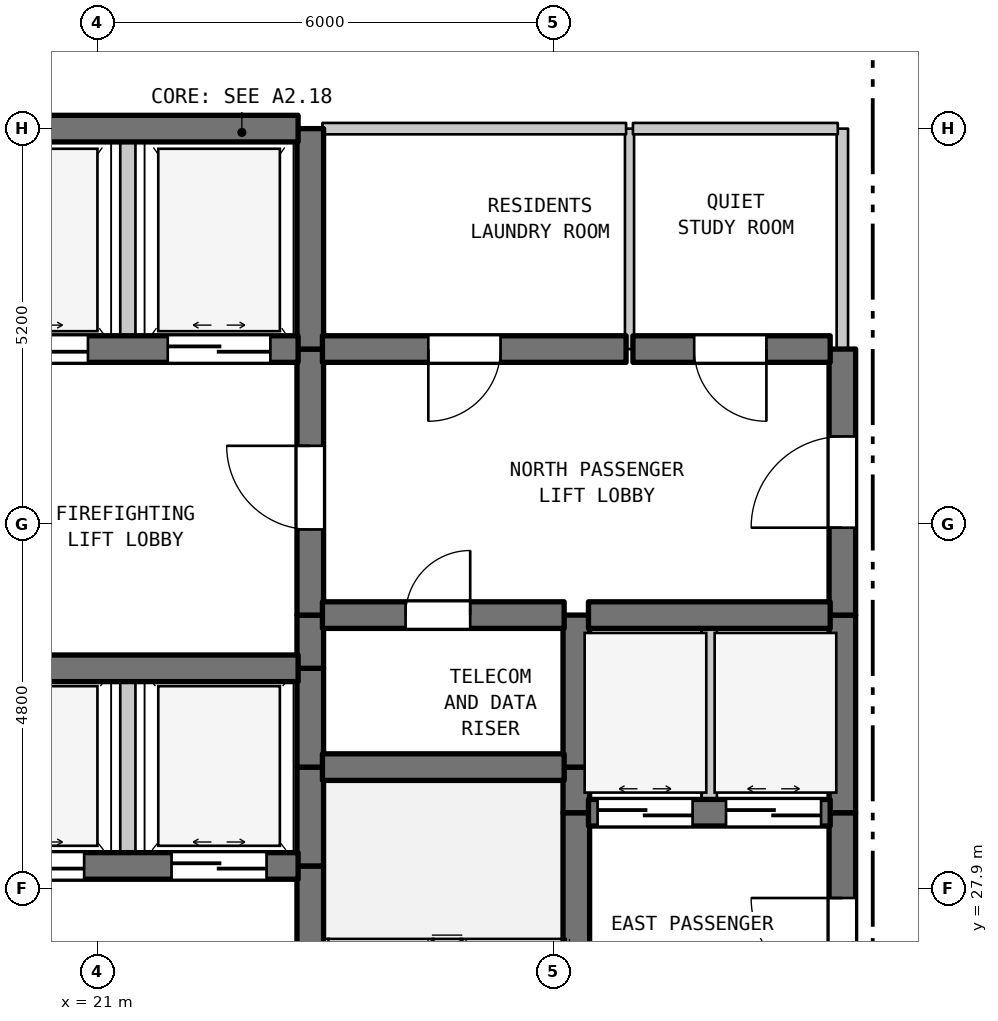
"""IFC4 building model, lengths in metres.
Left out: names, types, materials, properties, quantities, classifications, styles, units other than length and angle.
Written with IfcOpenShell. Run it as: python <this file> out.ifc"""

import sys

from ifc_helpers import new_model, si_unit, direction, frame, frame_2d, origin, place, context, subcontext, project, spatial, rectangle, extrude, element, fill, save


model = new_model("IFC4")
c1 = context("Model", 3, precision=1e-05, world=origin(), true_north=direction((0.0, 1.0)))
c2 = subcontext(c1, "Body", "Model", "MODEL_VIEW")
j1 = project(units=[si_unit("LENGTHUNIT", "METRE"), si_unit("PLANEANGLEUNIT", "RADIAN")], contexts=[c1])
p1 = place(None, origin())
s1 = spatial("IfcSite", under=j1, at=p1, CompositionType="ELEMENT")
p2 = place(p1, origin())
s2 = spatial("IfcBuilding", under=s1, at=p2, CompositionType="ELEMENT")
p3 = place(p2, frame((0.0, 0.0, 148.3)))
s3 = spatial("IfcBuildingStorey", under=s2, at=p3, CompositionType="ELEMENT", Elevation=148.3)
p4 = place(p3, frame((21.4, 28.2, 0.0), z_axis=(0.0, 0.0, 1.0), x_axis=(0.0, 1.0, 0.0)))
e1 = element("IfcWall", 1, at=p4, inside=s3, PredefinedType="STANDARD", context=c2, shape_type="SweptSolid", body=[
    extrude(rectangle(XDim=2.6, YDim=0.2, at=frame_2d((1.3, 0.0))), origin(), (0.0, 0.0, 1.0), 3.385),
])
p5 = place(p3, frame((21.4, 35.0, 0.0), z_axis=(0.0, 0.0, 1.0), x_axis=(0.0, 1.0, 0.0)))
e2 = element("IfcWall", 2, at=p5, inside=s3, PredefinedType="STANDARD", context=c2, shape_type="SweptSolid", body=[
    extrude(rectangle(XDim=2.9, YDim=0.2, at=frame_2d((1.45, 0.0))), origin(), (0.0, 0.0, 1.0), 3.385),
])
p6 = place(p3, frame((23.8, 22.7, 0.0), z_axis=(0.0, 0.0, 1.0), x_axis=(0.0, 1.0, 0.0)))
e3 = element("IfcWall", 3, at=p6, inside=s3, PredefinedType="SHEAR", context=c2, shape_type="SweptSolid", body=[
    extrude(rectangle(XDim=5.5, YDim=0.35, at=frame_2d((2.75, 0.0))), origin(), (0.0, 0.0, 1.0), 3.385),
])
p7 = place(p6, frame((0.235, 0.0, 0.0)))
e4 = element("IfcOpeningElement", 4, at=p7, cuts=e3, PredefinedType="OPENING", context=c2, shape_type="SweptSolid", body=[
    extrude(rectangle(XDim=1.1, YDim=2.15, at=frame_2d((0.55, 1.075))), frame((0.0, 0.185, 0.0), z_axis=(0.0, -1.0, 0.0), x_axis=(1.0, 0.0, 0.0)), (0.0, 0.0, 1.0), 0.37),
])
for number, where, z_axis, x_axis in (
    (5, (23.8, 28.2, 0.0), (0.0, 0.0, 1.0), (0.0, 1.0, 0.0)),
    (6, (23.8, 29.5, 0.0), (0.0, 0.0, 1.0), (0.0, 1.0, 0.0)),
):
    element("IfcWall", number, at=place(p3, frame(where, z_axis=z_axis, x_axis=x_axis)), inside=s3, PredefinedType="SHEAR", context=c2, shape_type="SweptSolid", body=[
        extrude(rectangle(XDim=1.3, YDim=0.35, at=frame_2d((0.65, 0.0))), origin(), (0.0, 0.0, 1.0), 3.385),
    ])
p8 = place(p3, frame((23.8, 30.8, 0.0), z_axis=(0.0, 0.0, 1.0), x_axis=(0.0, 1.0, 0.0)))
e7 = element("IfcWall", 7, at=p8, inside=s3, PredefinedType="SHEAR", context=c2, shape_type="SweptSolid", body=[
    extrude(rectangle(XDim=0.7, YDim=0.35, at=frame_2d((0.35, 0.0))), origin(), (0.0, 0.0, 1.0), 3.385),
])
p9 = place(p3, frame((23.8, 31.5, 0.0), z_axis=(0.0, 0.0, 1.0), x_axis=(0.0, 1.0, 0.0)))
e8 = element("IfcWall", 8, at=p9, inside=s3, PredefinedType="SHEAR", context=c2, shape_type="SweptSolid", body=[
    extrude(rectangle(XDim=3.5, YDim=0.35, at=frame_2d((1.75, 0.0))), origin(), (0.0, 0.0, 1.0), 3.385),
])
p10 = place(p9, frame((1.127, 0.0, 0.0)))
e9 = element("IfcOpeningElement", 9, at=p10, cuts=e8, PredefinedType="OPENING", context=c2, shape_type="SweptSolid", body=[
    extrude(rectangle(XDim=1.1, YDim=2.15, at=frame_2d((0.55, 1.075))), frame((0.0, 0.185, 0.0), z_axis=(0.0, -1.0, 0.0), x_axis=(1.0, 0.0, 0.0)), (0.0, 0.0, 1.0), 0.37),
])
p11 = place(p3, frame((23.8, 35.0, 0.0), z_axis=(0.0, 0.0, 1.0), x_axis=(0.0, 1.0, 0.0)))
e10 = element("IfcWall", 10, at=p11, inside=s3, PredefinedType="SHEAR", context=c2, shape_type="SweptSolid", body=[
    extrude(rectangle(XDim=2.9, YDim=0.35, at=frame_2d((1.45, 0.0))), origin(), (0.0, 0.0, 1.0), 3.385),
])
p12 = place(p3, frame((27.3, 25.6, 0.0), z_axis=(0.0, 0.0, 1.0), x_axis=(0.0, 1.0, 0.0)))
e11 = element("IfcWall", 11, at=p12, inside=s3, PredefinedType="SHEAR", context=c2, shape_type="SweptSolid", body=[
    extrude(rectangle(XDim=3.3, YDim=0.35, at=frame_2d((1.65, 0.0))), origin(), (0.0, 0.0, 1.0), 3.385),
])
p13 = place(p3, frame((27.3, 28.9, 0.0), z_axis=(0.0, 0.0, 1.0), x_axis=(0.0, 1.0, 0.0)))
e12 = element("IfcWall", 12, at=p13, inside=s3, PredefinedType="SHEAR", context=c2, shape_type="SweptSolid", body=[
    extrude(rectangle(XDim=0.6, YDim=0.35, at=frame_2d((0.3, 0.0))), origin(), (0.0, 0.0, 1.0), 3.385),
])
p14 = place(p3, frame((27.3, 29.5, 0.0), z_axis=(0.0, 0.0, 1.0), x_axis=(0.0, 1.0, 0.0)))
e13 = element("IfcWall", 13, at=p14, inside=s3, PredefinedType="SHEAR", context=c2, shape_type="SweptSolid", body=[
    extrude(rectangle(XDim=2.0, YDim=0.35, at=frame_2d((1.0, 0.0))), origin(), (0.0, 0.0, 1.0), 3.385),
])
p15 = place(p3, frame((28.0, 35.0, 0.0), z_axis=(0.0, 0.0, 1.0), x_axis=(0.0, 1.0, 0.0)))
e14 = element("IfcWall", 14, at=p15, inside=s3, PredefinedType="PARTITIONING", context=c2, shape_type="SweptSolid", body=[
    extrude(rectangle(XDim=2.9, YDim=0.12, at=frame_2d((1.45, 0.0))), origin(), (0.0, 0.0, 1.0), 3.385),
])
p16 = place(p3, frame((29.05, 28.9, 0.0), z_axis=(0.0, 0.0, 1.0), x_axis=(0.0, 1.0, 0.0)))
e15 = element("IfcWall", 15, at=p16, inside=s3, PredefinedType="STANDARD", context=c2, shape_type="SweptSolid", body=[
    extrude(rectangle(XDim=2.6, YDim=0.2, at=frame_2d((1.3, 0.0))), origin(), (0.0, 0.0, 1.0), 3.385),
])
p17 = place(p3, frame((30.8, 25.6, 0.0), z_axis=(0.0, 0.0, 1.0), x_axis=(0.0, 1.0, 0.0)))
e16 = element("IfcWall", 16, at=p17, inside=s3, PredefinedType="SHEAR", context=c2, shape_type="SweptSolid", body=[
    extrude(rectangle(XDim=3.3, YDim=0.35, at=frame_2d((1.65, 0.0))), origin(), (0.0, 0.0, 1.0), 3.385),
])
p18 = place(p17, frame((0.978, 0.0, 0.0)))
e17 = element("IfcOpeningElement", 17, at=p18, cuts=e16, PredefinedType="OPENING", context=c2, shape_type="SweptSolid", body=[
    extrude(rectangle(XDim=1.2, YDim=2.2, at=frame_2d((0.6, 1.1))), frame((0.0, 0.185, 0.0), z_axis=(0.0, -1.0, 0.0), x_axis=(1.0, 0.0, 0.0)), (0.0, 0.0, 1.0), 0.37),
])
p19 = place(p3, frame((30.8, 28.9, 0.0), z_axis=(0.0, 0.0, 1.0), x_axis=(0.0, 1.0, 0.0)))
e18 = element("IfcWall", 18, at=p19, inside=s3, PredefinedType="SHEAR", context=c2, shape_type="SweptSolid", body=[
    extrude(rectangle(XDim=2.6, YDim=0.35, at=frame_2d((1.3, 0.0))), origin(), (0.0, 0.0, 1.0), 3.385),
])
p20 = place(p3, frame((30.8, 31.5, 0.0), z_axis=(0.0, 0.0, 1.0), x_axis=(0.0, 1.0, 0.0)))
e19 = element("IfcWall", 19, at=p20, inside=s3, PredefinedType="SHEAR", context=c2, shape_type="SweptSolid", body=[
    extrude(rectangle(XDim=3.5, YDim=0.35, at=frame_2d((1.75, 0.0))), origin(), (0.0, 0.0, 1.0), 3.385),
])
p21 = place(p20, frame((1.15, 0.0, 0.0)))
e20 = element("IfcOpeningElement", 20, at=p21, cuts=e19, PredefinedType="OPENING", context=c2, shape_type="SweptSolid", body=[
    extrude(rectangle(XDim=1.2, YDim=2.2, at=frame_2d((0.6, 1.1))), frame((0.0, 0.185, 0.0), z_axis=(0.0, -1.0, 0.0), x_axis=(1.0, 0.0, 0.0)), (0.0, 0.0, 1.0), 0.37),
])
p22 = place(p3, frame((30.8, 35.0, 0.0), z_axis=(0.0, 0.0, 1.0), x_axis=(0.0, 1.0, 0.0)))
e21 = element("IfcWall", 21, at=p22, inside=s3, PredefinedType="STANDARD", context=c2, shape_type="SweptSolid", body=[
    extrude(rectangle(XDim=2.9, YDim=0.15, at=frame_2d((1.45, 0.0))), origin(), (0.0, 0.0, 1.0), 3.385),
])
p23 = place(p3, frame((19.16, 28.2, 0.0), z_axis=(0.0, 0.0, 1.0), x_axis=(1.0, 0.0, 0.0)))
e22 = element("IfcWall", 22, at=p23, inside=s3, PredefinedType="SHEAR", context=c2, shape_type="SweptSolid", body=[
    extrude(rectangle(XDim=4.48, YDim=0.35, at=frame_2d((2.24, 0.0))), origin(), (0.0, 0.0, 1.0), 3.385),
])
p24 = place(p23, frame((0.415, 0.0, 0.0)))
e23 = element("IfcOpeningElement", 23, at=p24, cuts=e22, PredefinedType="OPENING", context=c2, shape_type="SweptSolid", body=[
    extrude(rectangle(XDim=1.25, YDim=2.2, at=frame_2d((0.625, 1.1))), frame((0.0, 0.185, 0.0), z_axis=(0.0, -1.0, 0.0), x_axis=(1.0, 0.0, 0.0)), (0.0, 0.0, 1.0), 0.37),
])
p25 = place(p23, frame((2.815, 0.0, 0.0)))
e24 = element("IfcOpeningElement", 24, at=p25, cuts=e22, PredefinedType="OPENING", context=c2, shape_type="SweptSolid", body=[
    extrude(rectangle(XDim=1.25, YDim=2.2, at=frame_2d((0.625, 1.1))), frame((0.0, 0.185, 0.0), z_axis=(0.0, -1.0, 0.0), x_axis=(1.0, 0.0, 0.0)), (0.0, 0.0, 1.0), 0.37),
])
p26 = place(p3, frame((27.46, 28.9, 0.0), z_axis=(0.0, 0.0, 1.0), x_axis=(1.0, 0.0, 0.0)))
e25 = element("IfcWall", 25, at=p26, inside=s3, PredefinedType="SHEAR", context=c2, shape_type="SweptSolid", body=[
    extrude(rectangle(XDim=3.18, YDim=0.35, at=frame_2d((1.59, 0.0))), origin(), (0.0, 0.0, 1.0), 3.385),
])
p27 = place(p26, frame((0.12, 0.0, 0.0)))
e26 = element("IfcOpeningElement", 26, at=p27, cuts=e25, PredefinedType="OPENING", context=c2, shape_type="SweptSolid", body=[
    extrude(rectangle(XDim=1.25, YDim=2.2, at=frame_2d((0.625, 1.1))), frame((0.0, 0.185, 0.0), z_axis=(0.0, -1.0, 0.0), x_axis=(1.0, 0.0, 0.0)), (0.0, 0.0, 1.0), 0.37),
])
p28 = place(p26, frame((1.81, 0.0, 0.0)))
e27 = element("IfcOpeningElement", 27, at=p28, cuts=e25, PredefinedType="OPENING", context=c2, shape_type="SweptSolid", body=[
    extrude(rectangle(XDim=1.25, YDim=2.2, at=frame_2d((0.625, 1.1))), frame((0.0, 0.185, 0.0), z_axis=(0.0, -1.0, 0.0), x_axis=(1.0, 0.0, 0.0)), (0.0, 0.0, 1.0), 0.37),
])
p29 = place(p3, frame((23.96, 29.5, 0.0), z_axis=(0.0, 0.0, 1.0), x_axis=(1.0, 0.0, 0.0)))
e28 = element("IfcWall", 28, at=p29, inside=s3, PredefinedType="SHEAR", context=c2, shape_type="SweptSolid", body=[
    extrude(rectangle(XDim=3.18, YDim=0.35, at=frame_2d((1.59, 0.0))), origin(), (0.0, 0.0, 1.0), 3.385),
])
p30 = place(p3, frame((19.16, 30.8, 0.0), z_axis=(0.0, 0.0, 1.0), x_axis=(1.0, 0.0, 0.0)))
e29 = element("IfcWall", 29, at=p30, inside=s3, PredefinedType="SHEAR", context=c2, shape_type="SweptSolid", body=[
    extrude(rectangle(XDim=4.48, YDim=0.35, at=frame_2d((2.24, 0.0))), origin(), (0.0, 0.0, 1.0), 3.385),
])
p31 = place(p3, frame((23.96, 31.5, 0.0), z_axis=(0.0, 0.0, 1.0), x_axis=(1.0, 0.0, 0.0)))
e30 = element("IfcWall", 30, at=p31, inside=s3, PredefinedType="SHEAR", context=c2, shape_type="SweptSolid", body=[
    extrude(rectangle(XDim=3.18, YDim=0.35, at=frame_2d((1.59, 0.0))), origin(), (0.0, 0.0, 1.0), 3.385),
])
p32 = place(p31, frame((1.094, 0.0, 0.0)))
e31 = element("IfcOpeningElement", 31, at=p32, cuts=e30, PredefinedType="OPENING", context=c2, shape_type="SweptSolid", body=[
    extrude(rectangle(XDim=0.85, YDim=2.1, at=frame_2d((0.425, 1.05))), frame((0.0, 0.185, 0.0), z_axis=(0.0, -1.0, 0.0), x_axis=(1.0, 0.0, 0.0)), (0.0, 0.0, 1.0), 0.37),
])
p33 = place(p3, frame((27.46, 31.5, 0.0), z_axis=(0.0, 0.0, 1.0), x_axis=(1.0, 0.0, 0.0)))
e32 = element("IfcWall", 32, at=p33, inside=s3, PredefinedType="SHEAR", context=c2, shape_type="SweptSolid", body=[
    extrude(rectangle(XDim=3.18, YDim=0.35, at=frame_2d((1.59, 0.0))), origin(), (0.0, 0.0, 1.0), 3.385),
])
p34 = place(p3, frame((19.16, 35.0, 0.0), z_axis=(0.0, 0.0, 1.0), x_axis=(1.0, 0.0, 0.0)))
e33 = element("IfcWall", 33, at=p34, inside=s3, PredefinedType="SHEAR", context=c2, shape_type="SweptSolid", body=[
    extrude(rectangle(XDim=4.48, YDim=0.35, at=frame_2d((2.24, 0.0))), origin(), (0.0, 0.0, 1.0), 3.385),
])
p35 = place(p34, frame((0.365, 0.0, 0.0)))
e34 = element("IfcOpeningElement", 34, at=p35, cuts=e33, PredefinedType="OPENING", context=c2, shape_type="SweptSolid", body=[
    extrude(rectangle(XDim=1.35, YDim=2.2, at=frame_2d((0.675, 1.1))), frame((0.0, 0.185, 0.0), z_axis=(0.0, -1.0, 0.0), x_axis=(1.0, 0.0, 0.0)), (0.0, 0.0, 1.0), 0.37),
])
p36 = place(p34, frame((2.765, 0.0, 0.0)))
e35 = element("IfcOpeningElement", 35, at=p36, cuts=e33, PredefinedType="OPENING", context=c2, shape_type="SweptSolid", body=[
    extrude(rectangle(XDim=1.35, YDim=2.2, at=frame_2d((0.675, 1.1))), frame((0.0, 0.185, 0.0), z_axis=(0.0, -1.0, 0.0), x_axis=(1.0, 0.0, 0.0)), (0.0, 0.0, 1.0), 0.37),
])
p37 = place(p3, frame((23.96, 35.0, 0.0), z_axis=(0.0, 0.0, 1.0), x_axis=(1.0, 0.0, 0.0)))
e36 = element("IfcWall", 36, at=p37, inside=s3, PredefinedType="SHEAR", context=c2, shape_type="SweptSolid", body=[
    extrude(rectangle(XDim=3.995, YDim=0.35, at=frame_2d((1.998, 0.0))), origin(), (0.0, 0.0, 1.0), 3.385),
])
p38 = place(p37, frame((1.393, 0.0, 0.0)))
e37 = element("IfcOpeningElement", 37, at=p38, cuts=e36, PredefinedType="OPENING", context=c2, shape_type="SweptSolid", body=[
    extrude(rectangle(XDim=0.95, YDim=2.15, at=frame_2d((0.475, 1.075))), frame((0.0, 0.185, 0.0), z_axis=(0.0, -1.0, 0.0), x_axis=(1.0, 0.0, 0.0)), (0.0, 0.0, 1.0), 0.37),
])
p39 = place(p3, frame((28.045, 35.0, 0.0), z_axis=(0.0, 0.0, 1.0), x_axis=(1.0, 0.0, 0.0)))
e38 = element("IfcWall", 38, at=p39, inside=s3, PredefinedType="SHEAR", context=c2, shape_type="SweptSolid", body=[
    extrude(rectangle(XDim=2.595, YDim=0.35, at=frame_2d((1.297, 0.0))), origin(), (0.0, 0.0, 1.0), 3.385),
])
p40 = place(p39, frame((0.806, 0.0, 0.0)))
e39 = element("IfcOpeningElement", 39, at=p40, cuts=e38, PredefinedType="OPENING", context=c2, shape_type="SweptSolid", body=[
    extrude(rectangle(XDim=0.95, YDim=2.15, at=frame_2d((0.475, 1.075))), frame((0.0, 0.185, 0.0), z_axis=(0.0, -1.0, 0.0), x_axis=(1.0, 0.0, 0.0)), (0.0, 0.0, 1.0), 0.37),
])
p41 = place(p3, frame((19.16, 37.9, 0.0), z_axis=(0.0, 0.0, 1.0), x_axis=(1.0, 0.0, 0.0)))
e40 = element("IfcWall", 40, at=p41, inside=s3, PredefinedType="SHEAR", context=c2, shape_type="SweptSolid", body=[
    extrude(rectangle(XDim=4.48, YDim=0.35, at=frame_2d((2.24, 0.0))), origin(), (0.0, 0.0, 1.0), 3.385),
])
p42 = place(p3, frame((23.96, 37.9, 0.0), z_axis=(0.0, 0.0, 1.0), x_axis=(1.0, 0.0, 0.0)))
e41 = element("IfcWall", 41, at=p42, inside=s3, PredefinedType="STANDARD", context=c2, shape_type="SweptSolid", body=[
    extrude(rectangle(XDim=3.995, YDim=0.15, at=frame_2d((1.998, 0.0))), origin(), (0.0, 0.0, 1.0), 2.885),
])
p43 = place(p3, frame((28.045, 37.9, 0.0), z_axis=(0.0, 0.0, 1.0), x_axis=(1.0, 0.0, 0.0)))
e42 = element("IfcWall", 42, at=p43, inside=s3, PredefinedType="STANDARD", context=c2, shape_type="SweptSolid", body=[
    extrude(rectangle(XDim=2.695, YDim=0.15, at=frame_2d((1.348, 0.0))), origin(), (0.0, 0.0, 1.0), 2.885),
])
p44 = place(p10, origin())
e43 = element("IfcDoor", 43, at=p44, inside=s3, OperationType="SINGLE_SWING_RIGHT", PredefinedType="DOOR", context=c2, shape_type="SweptSolid", body=[
    extrude(rectangle(XDim=1.1, YDim=2.15, at=frame_2d((0.55, 1.075))), frame((0.0, 0.025, 0.0), z_axis=(0.0, -1.0, 0.0), x_axis=(1.0, 0.0, 0.0)), (0.0, 0.0, 1.0), 0.05),
])
fill(e9, e43)
p45 = place(p18, origin())
e44 = element("IfcDoor", 44, at=p45, inside=s3, OperationType="SINGLE_SWING_RIGHT", PredefinedType="DOOR", context=c2, shape_type="SweptSolid", body=[
    extrude(rectangle(XDim=1.2, YDim=2.2, at=frame_2d((0.6, 1.1))), frame((0.0, 0.025, 0.0), z_axis=(0.0, -1.0, 0.0), x_axis=(1.0, 0.0, 0.0)), (0.0, 0.0, 1.0), 0.05),
])
fill(e17, e44)
p46 = place(p21, origin())
e45 = element("IfcDoor", 45, at=p46, inside=s3, OperationType="SINGLE_SWING_LEFT", PredefinedType="DOOR", context=c2, shape_type="SweptSolid", body=[
    extrude(rectangle(XDim=1.2, YDim=2.2, at=frame_2d((0.6, 1.1))), frame((0.0, 0.025, 0.0), z_axis=(0.0, -1.0, 0.0), x_axis=(1.0, 0.0, 0.0)), (0.0, 0.0, 1.0), 0.05),
])
fill(e20, e45)
p47 = place(p24, origin())
e46 = element("IfcDoor", 46, at=p47, inside=s3, OperationType="DOUBLE_DOOR_SLIDING", PredefinedType="DOOR", context=c2, shape_type="SweptSolid", body=[
    extrude(rectangle(XDim=1.25, YDim=2.2, at=frame_2d((0.625, 1.1))), frame((0.0, 0.025, 0.0), z_axis=(0.0, -1.0, 0.0), x_axis=(1.0, 0.0, 0.0)), (0.0, 0.0, 1.0), 0.05),
])
fill(e23, e46)
p48 = place(p25, origin())
e47 = element("IfcDoor", 47, at=p48, inside=s3, OperationType="DOUBLE_DOOR_SLIDING", PredefinedType="DOOR", context=c2, shape_type="SweptSolid", body=[
    extrude(rectangle(XDim=1.25, YDim=2.2, at=frame_2d((0.625, 1.1))), frame((0.0, 0.025, 0.0), z_axis=(0.0, -1.0, 0.0), x_axis=(1.0, 0.0, 0.0)), (0.0, 0.0, 1.0), 0.05),
])
fill(e24, e47)
p49 = place(p27, origin())
e48 = element("IfcDoor", 48, at=p49, inside=s3, OperationType="DOUBLE_DOOR_SLIDING", PredefinedType="DOOR", context=c2, shape_type="SweptSolid", body=[
    extrude(rectangle(XDim=1.25, YDim=2.2, at=frame_2d((0.625, 1.1))), frame((0.0, 0.025, 0.0), z_axis=(0.0, -1.0, 0.0), x_axis=(1.0, 0.0, 0.0)), (0.0, 0.0, 1.0), 0.05),
])
fill(e26, e48)
p50 = place(p28, origin())
e49 = element("IfcDoor", 49, at=p50, inside=s3, OperationType="DOUBLE_DOOR_SLIDING", PredefinedType="DOOR", context=c2, shape_type="SweptSolid", body=[
    extrude(rectangle(XDim=1.25, YDim=2.2, at=frame_2d((0.625, 1.1))), frame((0.0, 0.025, 0.0), z_axis=(0.0, -1.0, 0.0), x_axis=(1.0, 0.0, 0.0)), (0.0, 0.0, 1.0), 0.05),
])
fill(e27, e49)
p51 = place(p32, origin())
e50 = element("IfcDoor", 50, at=p51, inside=s3, OperationType="SINGLE_SWING_RIGHT", PredefinedType="DOOR", context=c2, shape_type="SweptSolid", body=[
    extrude(rectangle(XDim=0.85, YDim=2.1, at=frame_2d((0.425, 1.05))), frame((0.0, 0.025, 0.0), z_axis=(0.0, -1.0, 0.0), x_axis=(1.0, 0.0, 0.0)), (0.0, 0.0, 1.0), 0.05),
])
fill(e31, e50)
p52 = place(p35, origin())
e51 = element("IfcDoor", 51, at=p52, inside=s3, OperationType="DOUBLE_DOOR_SLIDING", PredefinedType="DOOR", context=c2, shape_type="SweptSolid", body=[
    extrude(rectangle(XDim=1.35, YDim=2.2, at=frame_2d((0.675, 1.1))), frame((0.0, 0.025, 0.0), z_axis=(0.0, -1.0, 0.0), x_axis=(1.0, 0.0, 0.0)), (0.0, 0.0, 1.0), 0.05),
])
fill(e34, e51)
p53 = place(p36, origin())
e52 = element("IfcDoor", 52, at=p53, inside=s3, OperationType="DOUBLE_DOOR_SLIDING", PredefinedType="DOOR", context=c2, shape_type="SweptSolid", body=[
    extrude(rectangle(XDim=1.35, YDim=2.2, at=frame_2d((0.675, 1.1))), frame((0.0, 0.025, 0.0), z_axis=(0.0, -1.0, 0.0), x_axis=(1.0, 0.0, 0.0)), (0.0, 0.0, 1.0), 0.05),
])
fill(e35, e52)
p54 = place(p38, frame((0.95, 0.0, 0.0), z_axis=(0.0, 0.0, 1.0), x_axis=(-1.0, 0.0, 0.0)))
e53 = element("IfcDoor", 53, at=p54, inside=s3, OperationType="SINGLE_SWING_LEFT", PredefinedType="DOOR", context=c2, shape_type="SweptSolid", body=[
    extrude(rectangle(XDim=0.95, YDim=2.15, at=frame_2d((0.475, 1.075))), frame((0.0, 0.025, 0.0), z_axis=(0.0, -1.0, 0.0), x_axis=(1.0, 0.0, 0.0)), (0.0, 0.0, 1.0), 0.05),
])
fill(e37, e53)
p55 = place(p40, frame((0.95, 0.0, 0.0), z_axis=(0.0, 0.0, 1.0), x_axis=(-1.0, 0.0, 0.0)))
e54 = element("IfcDoor", 54, at=p55, inside=s3, OperationType="SINGLE_SWING_RIGHT", PredefinedType="DOOR", context=c2, shape_type="SweptSolid", body=[
    extrude(rectangle(XDim=0.95, YDim=2.15, at=frame_2d((0.475, 1.075))), frame((0.0, 0.025, 0.0), z_axis=(0.0, -1.0, 0.0), x_axis=(1.0, 0.0, 0.0)), (0.0, 0.0, 1.0), 0.05),
])
fill(e39, e54)
save(model, sys.argv[1])
